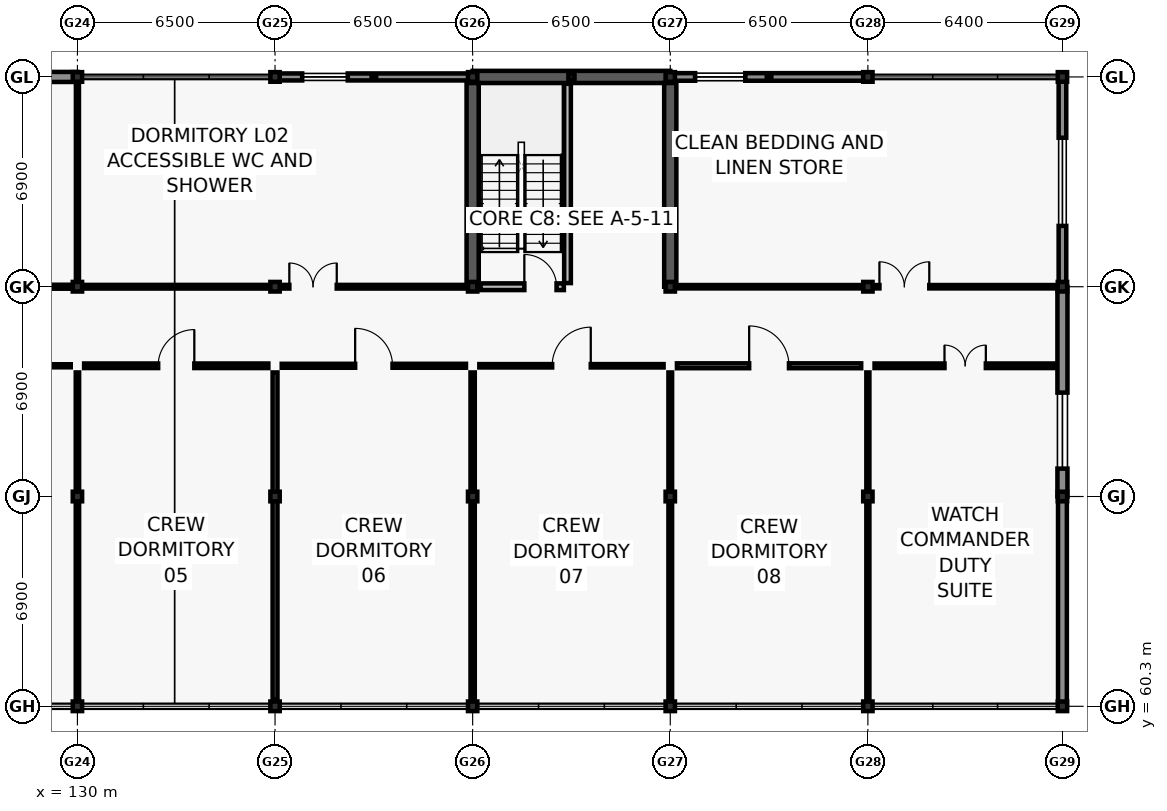
"""IFC4 building model, lengths in metres.
Left out: names, types, materials, properties, quantities, classifications, styles, units other than length and angle.
Written with IfcOpenShell. Run it as: python <this file> out.ifc"""

import sys

from ifc_helpers import new_model, si_unit, direction, frame, frame_2d, origin, origin_2d, place, context, subcontext, project, spatial, rectangle, hollow_rectangle, i_section, extrude, element, fill, save


model = new_model("IFC4")
c1 = context("Model", 3, precision=1e-05, world=origin(), true_north=direction((0.0, 1.0)))
c2 = subcontext(c1, "Body", "Model", "MODEL_VIEW")
j1 = project(units=[si_unit("LENGTHUNIT", "METRE"), si_unit("PLANEANGLEUNIT", "RADIAN")], contexts=[c1])
p1 = place(None, origin())
s1 = spatial("IfcSite", under=j1, at=p1, CompositionType="ELEMENT")
p2 = place(p1, origin())
s2 = spatial("IfcBuilding", under=s1, at=p2, CompositionType="ELEMENT")
p3 = place(p2, frame((0.0, 0.0, 9.6)))
s3 = spatial("IfcBuildingStorey", under=s2, at=p3, CompositionType="ELEMENT", Elevation=9.6)
for number, where, z_axis, x_axis in (
    (1, (130.0, 60.3, 0.0), (0.0, 0.0, 1.0), (1.0, 0.0, 0.0)),
    (2, (130.0, 67.2, 0.0), (0.0, 0.0, 1.0), (1.0, 0.0, 0.0)),
    (3, (130.0, 74.1, 0.0), (0.0, 0.0, 1.0), (1.0, 0.0, 0.0)),
    (4, (130.0, 81.0, 0.0), (0.0, 0.0, 1.0), (1.0, 0.0, 0.0)),
    (5, (136.5, 60.3, 0.0), (0.0, 0.0, 1.0), (1.0, 0.0, 0.0)),
    (6, (136.5, 67.2, 0.0), (0.0, 0.0, 1.0), (1.0, 0.0, 0.0)),
    (7, (136.5, 74.1, 0.0), (0.0, 0.0, 1.0), (1.0, 0.0, 0.0)),
    (8, (136.5, 81.0, 0.0), (0.0, 0.0, 1.0), (1.0, 0.0, 0.0)),
    (9, (143.0, 60.3, 0.0), (0.0, 0.0, 1.0), (1.0, 0.0, 0.0)),
    (10, (143.0, 67.2, 0.0), (0.0, 0.0, 1.0), (1.0, 0.0, 0.0)),
    (11, (143.0, 74.1, 0.0), (0.0, 0.0, 1.0), (1.0, 0.0, 0.0)),
    (12, (143.0, 81.0, 0.0), (0.0, 0.0, 1.0), (1.0, 0.0, 0.0)),
    (13, (149.5, 60.3, 0.0), (0.0, 0.0, 1.0), (1.0, 0.0, 0.0)),
    (14, (149.5, 67.2, 0.0), (0.0, 0.0, 1.0), (1.0, 0.0, 0.0)),
    (15, (149.5, 74.1, 0.0), (0.0, 0.0, 1.0), (1.0, 0.0, 0.0)),
    (16, (149.5, 81.0, 0.0), (0.0, 0.0, 1.0), (1.0, 0.0, 0.0)),
    (17, (156.0, 60.3, 0.0), (0.0, 0.0, 1.0), (1.0, 0.0, 0.0)),
    (18, (156.0, 67.2, 0.0), (0.0, 0.0, 1.0), (1.0, 0.0, 0.0)),
    (19, (156.0, 74.1, 0.0), (0.0, 0.0, 1.0), (1.0, 0.0, 0.0)),
    (20, (156.0, 81.0, 0.0), (0.0, 0.0, 1.0), (1.0, 0.0, 0.0)),
    (21, (162.4, 60.3, 0.0), (0.0, 0.0, 1.0), (1.0, 0.0, 0.0)),
    (22, (162.4, 67.2, 0.0), (0.0, 0.0, 1.0), (1.0, 0.0, 0.0)),
    (23, (162.4, 74.1, 0.0), (0.0, 0.0, 1.0), (1.0, 0.0, 0.0)),
    (24, (162.4, 81.0, 0.0), (0.0, 0.0, 1.0), (1.0, 0.0, 0.0)),
):
    element("IfcColumn", number, at=place(p3, frame(where, z_axis=z_axis, x_axis=x_axis)), inside=s3, PredefinedType="COLUMN", context=c2, shape_type="SweptSolid", body=[
        extrude(i_section(OverallWidth=0.307, OverallDepth=0.315, WebThickness=0.012, FlangeThickness=0.019, FilletRadius=0.017, at=origin_2d()), origin(), (0.0, 0.0, 1.0), 3.9),
    ])
p4 = place(p3, frame((139.75, 81.0, 0.0), z_axis=(0.0, 0.0, 1.0), x_axis=(1.0, 0.0, 0.0)))
e25 = element("IfcColumn", 25, at=p4, inside=s3, PredefinedType="PILASTER", context=c2, shape_type="SweptSolid", body=[
    extrude(hollow_rectangle(XDim=0.15, YDim=0.15, WallThickness=0.009, at=origin_2d()), origin(), (0.0, 0.0, 1.0), 3.9),
])
p5 = place(p3, frame((146.25, 81.0, 0.0), z_axis=(0.0, 0.0, 1.0), x_axis=(1.0, 0.0, 0.0)))
e26 = element("IfcColumn", 26, at=p5, inside=s3, PredefinedType="PILASTER", context=c2, shape_type="SweptSolid", body=[
    extrude(hollow_rectangle(XDim=0.2, YDim=0.2, WallThickness=0.01, at=origin_2d()), origin(), (0.0, 0.0, 1.0), 3.9),
])
p6 = place(p3, frame((152.75, 81.0, 0.0), z_axis=(0.0, 0.0, 1.0), x_axis=(1.0, 0.0, 0.0)))
e27 = element("IfcColumn", 27, at=p6, inside=s3, PredefinedType="PILASTER", context=c2, shape_type="SweptSolid", body=[
    extrude(hollow_rectangle(XDim=0.15, YDim=0.15, WallThickness=0.009, at=origin_2d()), origin(), (0.0, 0.0, 1.0), 3.9),
])
p7 = place(p3, frame((143.0, 81.0, 0.0), z_axis=(0.0, 0.0, 1.0), x_axis=(1.0, 0.0, 0.0)))
e28 = element("IfcWall", 28, at=p7, inside=s3, PredefinedType="SHEAR", context=c2, shape_type="SweptSolid", body=[
    extrude(rectangle(XDim=6.5, YDim=0.4, at=frame_2d((3.25, 0.0))), origin(), (0.0, 0.0, 1.0), 3.66),
])
for number, where, z_axis, x_axis in (
    (29, (143.0, 74.1, 0.0), (0.0, 0.0, 1.0), (0.0, 1.0, 0.0)),
    (30, (149.5, 74.1, 0.0), (0.0, 0.0, 1.0), (0.0, 1.0, 0.0)),
):
    element("IfcWall", number, at=place(p3, frame(where, z_axis=z_axis, x_axis=x_axis)), inside=s3, PredefinedType="SHEAR", context=c2, shape_type="SweptSolid", body=[
        extrude(rectangle(XDim=6.7, YDim=0.4, at=frame_2d((3.35, 0.0))), origin(), (0.0, 0.0, 1.0), 3.66),
    ])
p8 = place(p3, frame((123.505, 81.0, 0.0), z_axis=(0.0, 0.0, 1.0), x_axis=(1.0, 0.0, 0.0)))
e31 = element("IfcWall", 31, at=p8, inside=s3, PredefinedType="SOLIDWALL", context=c2, shape_type="SweptSolid", body=[
    extrude(rectangle(XDim=6.49, YDim=0.33, at=frame_2d((3.245, 0.0))), origin(), (0.0, 0.0, 1.0), 3.02),
])
p9 = place(p8, frame((0.962, 0.0, 0.8)))
e32 = element("IfcOpeningElement", 32, at=p9, cuts=e31, PredefinedType="OPENING", context=c2, shape_type="SweptSolid", body=[
    extrude(rectangle(XDim=1.35, YDim=2.05, at=frame_2d((0.675, 1.025))), frame((0.0, 0.175, 0.0), z_axis=(0.0, -1.0, 0.0), x_axis=(1.0, 0.0, 0.0)), (0.0, 0.0, 1.0), 0.35),
])
p10 = place(p3, frame((136.505, 81.0, 0.0), z_axis=(0.0, 0.0, 1.0), x_axis=(1.0, 0.0, 0.0)))
e33 = element("IfcWall", 33, at=p10, inside=s3, PredefinedType="SOLIDWALL", context=c2, shape_type="SweptSolid", body=[
    extrude(rectangle(XDim=6.49, YDim=0.23, at=frame_2d((3.245, 0.0))), origin(), (0.0, 0.0, 1.0), 3.02),
])
p11 = place(p10, frame((0.887, 0.0, 0.8)))
e34 = element("IfcOpeningElement", 34, at=p11, cuts=e33, PredefinedType="OPENING", context=c2, shape_type="SweptSolid", body=[
    extrude(rectangle(XDim=1.5, YDim=2.05, at=frame_2d((0.75, 1.025))), frame((0.0, 0.125, 0.0), z_axis=(0.0, -1.0, 0.0), x_axis=(1.0, 0.0, 0.0)), (0.0, 0.0, 1.0), 0.25),
])
p12 = place(p3, frame((149.505, 81.0, 0.0), z_axis=(0.0, 0.0, 1.0), x_axis=(1.0, 0.0, 0.0)))
e35 = element("IfcWall", 35, at=p12, inside=s3, PredefinedType="SOLIDWALL", context=c2, shape_type="SweptSolid", body=[
    extrude(rectangle(XDim=6.49, YDim=0.25, at=frame_2d((3.245, 0.0))), origin(), (0.0, 0.0, 1.0), 3.02),
])
p13 = place(p12, frame((0.812, 0.0, 0.8)))
e36 = element("IfcOpeningElement", 36, at=p13, cuts=e35, PredefinedType="OPENING", context=c2, shape_type="SweptSolid", body=[
    extrude(rectangle(XDim=1.65, YDim=2.05, at=frame_2d((0.825, 1.025))), frame((0.0, 0.135, 0.0), z_axis=(0.0, -1.0, 0.0), x_axis=(1.0, 0.0, 0.0)), (0.0, 0.0, 1.0), 0.27),
])
p14 = place(p3, frame((162.4, 67.195, 0.0), z_axis=(0.0, 0.0, 1.0), x_axis=(0.0, -1.0, 0.0)))
e37 = element("IfcWall", 37, at=p14, inside=s3, PredefinedType="SOLIDWALL", context=c2, shape_type="SweptSolid", body=[
    extrude(rectangle(XDim=6.89, YDim=0.29, at=frame_2d((3.445, 0.0))), origin(), (0.0, 0.0, 1.0), 3.02),
])
p15 = place(p3, frame((162.4, 74.095, 0.0), z_axis=(0.0, 0.0, 1.0), x_axis=(0.0, -1.0, 0.0)))
e38 = element("IfcWall", 38, at=p15, inside=s3, PredefinedType="SOLIDWALL", context=c2, shape_type="SweptSolid", body=[
    extrude(rectangle(XDim=6.89, YDim=0.33, at=frame_2d((3.445, 0.0))), origin(), (0.0, 0.0, 1.0), 3.02),
])
p16 = place(p15, frame((3.478, 0.0, 0.8)))
e39 = element("IfcOpeningElement", 39, at=p16, cuts=e38, PredefinedType="OPENING", context=c2, shape_type="SweptSolid", body=[
    extrude(rectangle(XDim=2.5, YDim=1.15, at=frame_2d((1.25, 0.575))), frame((0.0, 0.175, 0.0), z_axis=(0.0, -1.0, 0.0), x_axis=(1.0, 0.0, 0.0)), (0.0, 0.0, 1.0), 0.35),
])
p17 = place(p3, frame((162.4, 80.995, 0.0), z_axis=(0.0, 0.0, 1.0), x_axis=(0.0, -1.0, 0.0)))
e40 = element("IfcWall", 40, at=p17, inside=s3, PredefinedType="SOLIDWALL", context=c2, shape_type="SweptSolid", body=[
    extrude(rectangle(XDim=6.89, YDim=0.25, at=frame_2d((3.445, 0.0))), origin(), (0.0, 0.0, 1.0), 3.02),
])
p18 = place(p17, frame((1.995, 0.0, 0.8)))
e41 = element("IfcOpeningElement", 41, at=p18, cuts=e40, PredefinedType="OPENING", context=c2, shape_type="SweptSolid", body=[
    extrude(rectangle(XDim=2.9, YDim=1.15, at=frame_2d((1.45, 0.575))), frame((0.0, 0.135, 0.0), z_axis=(0.0, -1.0, 0.0), x_axis=(1.0, 0.0, 0.0)), (0.0, 0.0, 1.0), 0.27),
])
p19 = place(p3, frame((146.12, 74.22, 0.0), z_axis=(0.0, 0.0, 1.0), x_axis=(0.0, 1.0, 0.0)))
e42 = element("IfcWall", 42, at=p19, inside=s3, PredefinedType="SOLIDWALL", context=c2, shape_type="SweptSolid", body=[
    extrude(rectangle(XDim=6.555, YDim=0.22, at=frame_2d((3.277, 0.0))), origin(), (0.0, 0.0, 1.0), 3.66),
])
p20 = place(p3, frame((143.26, 74.1, 0.0), z_axis=(0.0, 0.0, 1.0), x_axis=(1.0, 0.0, 0.0)))
e43 = element("IfcWall", 43, at=p20, inside=s3, PredefinedType="SOLIDWALL", context=c2, shape_type="SweptSolid", body=[
    extrude(rectangle(XDim=2.74, YDim=0.22, at=frame_2d((1.37, 0.0))), origin(), (0.0, 0.0, 1.0), 3.02),
])
p21 = place(p20, frame((1.44, 0.0, 0.0)))
e44 = element("IfcOpeningElement", 44, at=p21, cuts=e43, PredefinedType="OPENING", context=c2, shape_type="SweptSolid", body=[
    extrude(rectangle(XDim=1.06, YDim=2.1, at=frame_2d((0.53, 1.05))), frame((0.0, 0.12, 0.0), z_axis=(0.0, -1.0, 0.0), x_axis=(1.0, 0.0, 0.0)), (0.0, 0.0, 1.0), 0.24),
])
p22 = place(p3, frame((130.0, 60.52, 0.0), z_axis=(0.0, 0.0, 1.0), x_axis=(0.0, 1.0, 0.0)))
e45 = element("IfcWall", 45, at=p22, inside=s3, PredefinedType="PARTITIONING", context=c2, shape_type="SweptSolid", body=[
    extrude(rectangle(XDim=10.76, YDim=0.11, at=frame_2d((5.38, 0.0))), origin(), (0.0, 0.0, 1.0), 3.0),
])
p23 = place(p3, frame((123.72, 71.5, 0.0), z_axis=(0.0, 0.0, 1.0), x_axis=(1.0, 0.0, 0.0)))
e46 = element("IfcWall", 46, at=p23, inside=s3, PredefinedType="PARTITIONING", context=c2, shape_type="SweptSolid", body=[
    extrude(rectangle(XDim=6.06, YDim=0.1, at=frame_2d((3.03, 0.0))), origin(), (0.0, 0.0, 1.0), 3.0),
])
p24 = place(p23, frame((2.455, 0.0, 0.0)))
e47 = element("IfcOpeningElement", 47, at=p24, cuts=e46, PredefinedType="OPENING", context=c2, shape_type="SweptSolid", body=[
    extrude(rectangle(XDim=1.15, YDim=2.12, at=frame_2d((0.575, 1.06))), frame((0.0, 0.06, 0.0), z_axis=(0.0, -1.0, 0.0), x_axis=(1.0, 0.0, 0.0)), (0.0, 0.0, 1.0), 0.12),
])
p25 = place(p3, frame((136.5, 60.52, 0.0), z_axis=(0.0, 0.0, 1.0), x_axis=(0.0, 1.0, 0.0)))
e48 = element("IfcWall", 48, at=p25, inside=s3, PredefinedType="PARTITIONING", context=c2, shape_type="SweptSolid", body=[
    extrude(rectangle(XDim=10.76, YDim=0.16, at=frame_2d((5.38, 0.0))), origin(), (0.0, 0.0, 1.0), 3.0),
])
p26 = place(p3, frame((130.22, 71.5, 0.0), z_axis=(0.0, 0.0, 1.0), x_axis=(1.0, 0.0, 0.0)))
e49 = element("IfcWall", 49, at=p26, inside=s3, PredefinedType="PARTITIONING", context=c2, shape_type="SweptSolid", body=[
    extrude(rectangle(XDim=6.06, YDim=0.15, at=frame_2d((3.03, 0.0))), origin(), (0.0, 0.0, 1.0), 3.0),
])
p27 = place(p26, frame((2.435, 0.0, 0.0)))
e50 = element("IfcOpeningElement", 50, at=p27, cuts=e49, PredefinedType="OPENING", context=c2, shape_type="SweptSolid", body=[
    extrude(rectangle(XDim=1.19, YDim=2.14, at=frame_2d((0.595, 1.07))), frame((0.0, 0.085, 0.0), z_axis=(0.0, -1.0, 0.0), x_axis=(1.0, 0.0, 0.0)), (0.0, 0.0, 1.0), 0.17),
])
p28 = place(p3, frame((143.0, 60.52, 0.0), z_axis=(0.0, 0.0, 1.0), x_axis=(0.0, 1.0, 0.0)))
e51 = element("IfcWall", 51, at=p28, inside=s3, PredefinedType="PARTITIONING", context=c2, shape_type="SweptSolid", body=[
    extrude(rectangle(XDim=10.76, YDim=0.14, at=frame_2d((5.38, 0.0))), origin(), (0.0, 0.0, 1.0), 3.0),
])
p29 = place(p3, frame((136.72, 71.5, 0.0), z_axis=(0.0, 0.0, 1.0), x_axis=(1.0, 0.0, 0.0)))
e52 = element("IfcWall", 52, at=p29, inside=s3, PredefinedType="PARTITIONING", context=c2, shape_type="SweptSolid", body=[
    extrude(rectangle(XDim=6.06, YDim=0.13, at=frame_2d((3.03, 0.0))), origin(), (0.0, 0.0, 1.0), 3.0),
])
p30 = place(p29, frame((2.415, 0.0, 0.0)))
e53 = element("IfcOpeningElement", 53, at=p30, cuts=e52, PredefinedType="OPENING", context=c2, shape_type="SweptSolid", body=[
    extrude(rectangle(XDim=1.23, YDim=2.08, at=frame_2d((0.615, 1.04))), frame((0.0, 0.075, 0.0), z_axis=(0.0, -1.0, 0.0), x_axis=(1.0, 0.0, 0.0)), (0.0, 0.0, 1.0), 0.15),
])
p31 = place(p3, frame((149.5, 60.52, 0.0), z_axis=(0.0, 0.0, 1.0), x_axis=(0.0, 1.0, 0.0)))
e54 = element("IfcWall", 54, at=p31, inside=s3, PredefinedType="PARTITIONING", context=c2, shape_type="SweptSolid", body=[
    extrude(rectangle(XDim=10.76, YDim=0.12, at=frame_2d((5.38, 0.0))), origin(), (0.0, 0.0, 1.0), 3.0),
])
p32 = place(p3, frame((143.22, 71.5, 0.0), z_axis=(0.0, 0.0, 1.0), x_axis=(1.0, 0.0, 0.0)))
e55 = element("IfcWall", 55, at=p32, inside=s3, PredefinedType="PARTITIONING", context=c2, shape_type="SweptSolid", body=[
    extrude(rectangle(XDim=6.06, YDim=0.11, at=frame_2d((3.03, 0.0))), origin(), (0.0, 0.0, 1.0), 3.0),
])
p33 = place(p32, frame((2.395, 0.0, 0.0)))
e56 = element("IfcOpeningElement", 56, at=p33, cuts=e55, PredefinedType="OPENING", context=c2, shape_type="SweptSolid", body=[
    extrude(rectangle(XDim=1.27, YDim=2.1, at=frame_2d((0.635, 1.05))), frame((0.0, 0.065, 0.0), z_axis=(0.0, -1.0, 0.0), x_axis=(1.0, 0.0, 0.0)), (0.0, 0.0, 1.0), 0.13),
])
p34 = place(p3, frame((156.0, 60.52, 0.0), z_axis=(0.0, 0.0, 1.0), x_axis=(0.0, 1.0, 0.0)))
e57 = element("IfcWall", 57, at=p34, inside=s3, PredefinedType="PARTITIONING", context=c2, shape_type="SweptSolid", body=[
    extrude(rectangle(XDim=10.76, YDim=0.1, at=frame_2d((5.38, 0.0))), origin(), (0.0, 0.0, 1.0), 3.0),
])
p35 = place(p3, frame((149.72, 71.5, 0.0), z_axis=(0.0, 0.0, 1.0), x_axis=(1.0, 0.0, 0.0)))
e58 = element("IfcWall", 58, at=p35, inside=s3, PredefinedType="PARTITIONING", context=c2, shape_type="SweptSolid", body=[
    extrude(rectangle(XDim=6.06, YDim=0.16, at=frame_2d((3.03, 0.0))), origin(), (0.0, 0.0, 1.0), 3.0),
])
p36 = place(p35, frame((2.375, 0.0, 0.0)))
e59 = element("IfcOpeningElement", 59, at=p36, cuts=e58, PredefinedType="OPENING", context=c2, shape_type="SweptSolid", body=[
    extrude(rectangle(XDim=1.31, YDim=2.14, at=frame_2d((0.655, 1.07))), frame((0.0, 0.09, 0.0), z_axis=(0.0, -1.0, 0.0), x_axis=(1.0, 0.0, 0.0)), (0.0, 0.0, 1.0), 0.18),
])
p37 = place(p3, frame((156.22, 71.5, 0.0), z_axis=(0.0, 0.0, 1.0), x_axis=(1.0, 0.0, 0.0)))
e60 = element("IfcWall", 60, at=p37, inside=s3, PredefinedType="PARTITIONING", context=c2, shape_type="SweptSolid", body=[
    extrude(rectangle(XDim=5.96, YDim=0.15, at=frame_2d((2.98, 0.0))), origin(), (0.0, 0.0, 1.0), 3.0),
])
p38 = place(p37, frame((2.3, 0.0, 0.0)))
e61 = element("IfcOpeningElement", 61, at=p38, cuts=e60, PredefinedType="OPENING", context=c2, shape_type="SweptSolid", body=[
    extrude(rectangle(XDim=1.36, YDim=2.15, at=frame_2d((0.68, 1.075))), frame((0.0, 0.085, 0.0), z_axis=(0.0, -1.0, 0.0), x_axis=(1.0, 0.0, 0.0)), (0.0, 0.0, 1.0), 0.17),
])
p39 = place(p3, frame((117.22, 74.1, 0.0), z_axis=(0.0, 0.0, 1.0), x_axis=(1.0, 0.0, 0.0)))
e62 = element("IfcWall", 62, at=p39, inside=s3, PredefinedType="PARTITIONING", context=c2, shape_type="SweptSolid", body=[
    extrude(rectangle(XDim=12.56, YDim=0.13, at=frame_2d((6.28, 0.0))), origin(), (0.0, 0.0, 1.0), 3.0),
])
p40 = place(p39, frame((6.54, 0.0, 0.0)))
e63 = element("IfcOpeningElement", 63, at=p40, cuts=e62, PredefinedType="OPENING", context=c2, shape_type="SweptSolid", body=[
    extrude(rectangle(XDim=1.48, YDim=2.18, at=frame_2d((0.74, 1.09))), frame((0.0, 0.075, 0.0), z_axis=(0.0, -1.0, 0.0), x_axis=(1.0, 0.0, 0.0)), (0.0, 0.0, 1.0), 0.15),
])
p41 = place(p3, frame((130.22, 74.1, 0.0), z_axis=(0.0, 0.0, 1.0), x_axis=(1.0, 0.0, 0.0)))
e64 = element("IfcWall", 64, at=p41, inside=s3, PredefinedType="PARTITIONING", context=c2, shape_type="SweptSolid", body=[
    extrude(rectangle(XDim=12.56, YDim=0.12, at=frame_2d((6.28, 0.0))), origin(), (0.0, 0.0, 1.0), 3.0),
])
p42 = place(p41, frame((6.75, 0.0, 0.0)))
e65 = element("IfcOpeningElement", 65, at=p42, cuts=e64, PredefinedType="OPENING", context=c2, shape_type="SweptSolid", body=[
    extrude(rectangle(XDim=1.56, YDim=2.18, at=frame_2d((0.78, 1.09))), frame((0.0, 0.07, 0.0), z_axis=(0.0, -1.0, 0.0), x_axis=(1.0, 0.0, 0.0)), (0.0, 0.0, 1.0), 0.14),
])
p43 = place(p3, frame((149.72, 74.1, 0.0), z_axis=(0.0, 0.0, 1.0), x_axis=(1.0, 0.0, 0.0)))
e66 = element("IfcWall", 66, at=p43, inside=s3, PredefinedType="PARTITIONING", context=c2, shape_type="SweptSolid", body=[
    extrude(rectangle(XDim=12.46, YDim=0.11, at=frame_2d((6.23, 0.0))), origin(), (0.0, 0.0, 1.0), 3.0),
])
p44 = place(p43, frame((6.66, 0.0, 0.0)))
e67 = element("IfcOpeningElement", 67, at=p44, cuts=e66, PredefinedType="OPENING", context=c2, shape_type="SweptSolid", body=[
    extrude(rectangle(XDim=1.64, YDim=2.2, at=frame_2d((0.82, 1.1))), frame((0.0, 0.065, 0.0), z_axis=(0.0, -1.0, 0.0), x_axis=(1.0, 0.0, 0.0)), (0.0, 0.0, 1.0), 0.13),
])
p45 = place(p3, frame((130.0, 74.32, 0.0), z_axis=(0.0, 0.0, 1.0), x_axis=(0.0, 1.0, 0.0)))
e68 = element("IfcWall", 68, at=p45, inside=s3, PredefinedType="PARTITIONING", context=c2, shape_type="SweptSolid", body=[
    extrude(rectangle(XDim=6.46, YDim=0.1, at=frame_2d((3.23, 0.0))), origin(), (0.0, 0.0, 1.0), 3.0),
])
p46 = place(p11, origin())
e69 = element("IfcWindow", 69, at=p46, inside=s3, PartitioningType="SINGLE_PANEL", PredefinedType="WINDOW", context=c2, shape_type="SweptSolid", body=[
    extrude(rectangle(XDim=1.5, YDim=2.05, at=frame_2d((0.75, 1.025))), frame((0.0, 0.03, 0.0), z_axis=(0.0, -1.0, 0.0), x_axis=(1.0, 0.0, 0.0)), (0.0, 0.0, 1.0), 0.06),
])
fill(e34, e69)
p47 = place(p13, origin())
e70 = element("IfcWindow", 70, at=p47, inside=s3, PartitioningType="DOUBLE_PANEL_VERTICAL", PredefinedType="WINDOW", context=c2, shape_type="SweptSolid", body=[
    extrude(rectangle(XDim=1.65, YDim=2.05, at=frame_2d((0.825, 1.025))), frame((0.0, 0.03, 0.0), z_axis=(0.0, -1.0, 0.0), x_axis=(1.0, 0.0, 0.0)), (0.0, 0.0, 1.0), 0.06),
])
fill(e36, e70)
p48 = place(p16, origin())
e71 = element("IfcWindow", 71, at=p48, inside=s3, PartitioningType="TRIPLE_PANEL_VERTICAL", PredefinedType="WINDOW", context=c2, shape_type="SweptSolid", body=[
    extrude(rectangle(XDim=2.5, YDim=1.15, at=frame_2d((1.25, 0.575))), frame((0.0, 0.03, 0.0), z_axis=(0.0, -1.0, 0.0), x_axis=(1.0, 0.0, 0.0)), (0.0, 0.0, 1.0), 0.06),
])
fill(e39, e71)
p49 = place(p18, origin())
e72 = element("IfcWindow", 72, at=p49, inside=s3, PartitioningType="TRIPLE_PANEL_VERTICAL", PredefinedType="WINDOW", context=c2, shape_type="SweptSolid", body=[
    extrude(rectangle(XDim=2.9, YDim=1.15, at=frame_2d((1.45, 0.575))), frame((0.0, 0.03, 0.0), z_axis=(0.0, -1.0, 0.0), x_axis=(1.0, 0.0, 0.0)), (0.0, 0.0, 1.0), 0.06),
])
fill(e41, e72)
p50 = place(p21, origin())
e73 = element("IfcDoor", 73, at=p50, inside=s3, OperationType="SINGLE_SWING_LEFT", PredefinedType="DOOR", context=c2, shape_type="SweptSolid", body=[
    extrude(rectangle(XDim=1.06, YDim=2.1, at=frame_2d((0.53, 1.05))), frame((0.0, 0.025, 0.0), z_axis=(0.0, -1.0, 0.0), x_axis=(1.0, 0.0, 0.0)), (0.0, 0.0, 1.0), 0.05),
])
fill(e44, e73)
p51 = place(p27, origin())
e74 = element("IfcDoor", 74, at=p51, inside=s3, OperationType="SINGLE_SWING_RIGHT", PredefinedType="DOOR", context=c2, shape_type="SweptSolid", body=[
    extrude(rectangle(XDim=1.19, YDim=2.14, at=frame_2d((0.595, 1.07))), frame((0.0, 0.025, 0.0), z_axis=(0.0, -1.0, 0.0), x_axis=(1.0, 0.0, 0.0)), (0.0, 0.0, 1.0), 0.05),
])
fill(e50, e74)
p52 = place(p30, origin())
e75 = element("IfcDoor", 75, at=p52, inside=s3, OperationType="SINGLE_SWING_LEFT", PredefinedType="DOOR", context=c2, shape_type="SweptSolid", body=[
    extrude(rectangle(XDim=1.23, YDim=2.08, at=frame_2d((0.615, 1.04))), frame((0.0, 0.025, 0.0), z_axis=(0.0, -1.0, 0.0), x_axis=(1.0, 0.0, 0.0)), (0.0, 0.0, 1.0), 0.05),
])
fill(e53, e75)
p53 = place(p33, origin())
e76 = element("IfcDoor", 76, at=p53, inside=s3, OperationType="SINGLE_SWING_RIGHT", PredefinedType="DOOR", context=c2, shape_type="SweptSolid", body=[
    extrude(rectangle(XDim=1.27, YDim=2.1, at=frame_2d((0.635, 1.05))), frame((0.0, 0.025, 0.0), z_axis=(0.0, -1.0, 0.0), x_axis=(1.0, 0.0, 0.0)), (0.0, 0.0, 1.0), 0.05),
])
fill(e56, e76)
p54 = place(p36, origin())
e77 = element("IfcDoor", 77, at=p54, inside=s3, OperationType="SINGLE_SWING_LEFT", PredefinedType="DOOR", context=c2, shape_type="SweptSolid", body=[
    extrude(rectangle(XDim=1.31, YDim=2.14, at=frame_2d((0.655, 1.07))), frame((0.0, 0.025, 0.0), z_axis=(0.0, -1.0, 0.0), x_axis=(1.0, 0.0, 0.0)), (0.0, 0.0, 1.0), 0.05),
])
fill(e59, e77)
p55 = place(p38, origin())
e78 = element("IfcDoor", 78, at=p55, inside=s3, OperationType="DOUBLE_DOOR_SINGLE_SWING", PredefinedType="DOOR", context=c2, shape_type="SweptSolid", body=[
    extrude(rectangle(XDim=1.36, YDim=2.15, at=frame_2d((0.68, 1.075))), frame((0.0, 0.025, 0.0), z_axis=(0.0, -1.0, 0.0), x_axis=(1.0, 0.0, 0.0)), (0.0, 0.0, 1.0), 0.05),
])
fill(e61, e78)
p56 = place(p42, origin())
e79 = element("IfcDoor", 79, at=p56, inside=s3, OperationType="DOUBLE_DOOR_SINGLE_SWING", PredefinedType="DOOR", context=c2, shape_type="SweptSolid", body=[
    extrude(rectangle(XDim=1.56, YDim=2.18, at=frame_2d((0.78, 1.09))), frame((0.0, 0.025, 0.0), z_axis=(0.0, -1.0, 0.0), x_axis=(1.0, 0.0, 0.0)), (0.0, 0.0, 1.0), 0.05),
])
fill(e65, e79)
p57 = place(p44, origin())
e80 = element("IfcDoor", 80, at=p57, inside=s3, OperationType="DOUBLE_DOOR_SINGLE_SWING", PredefinedType="DOOR", context=c2, shape_type="SweptSolid", body=[
    extrude(rectangle(XDim=1.64, YDim=2.2, at=frame_2d((0.82, 1.1))), frame((0.0, 0.025, 0.0), z_axis=(0.0, -1.0, 0.0), x_axis=(1.0, 0.0, 0.0)), (0.0, 0.0, 1.0), 0.05),
])
fill(e67, e80)
save(model, sys.argv[1])
